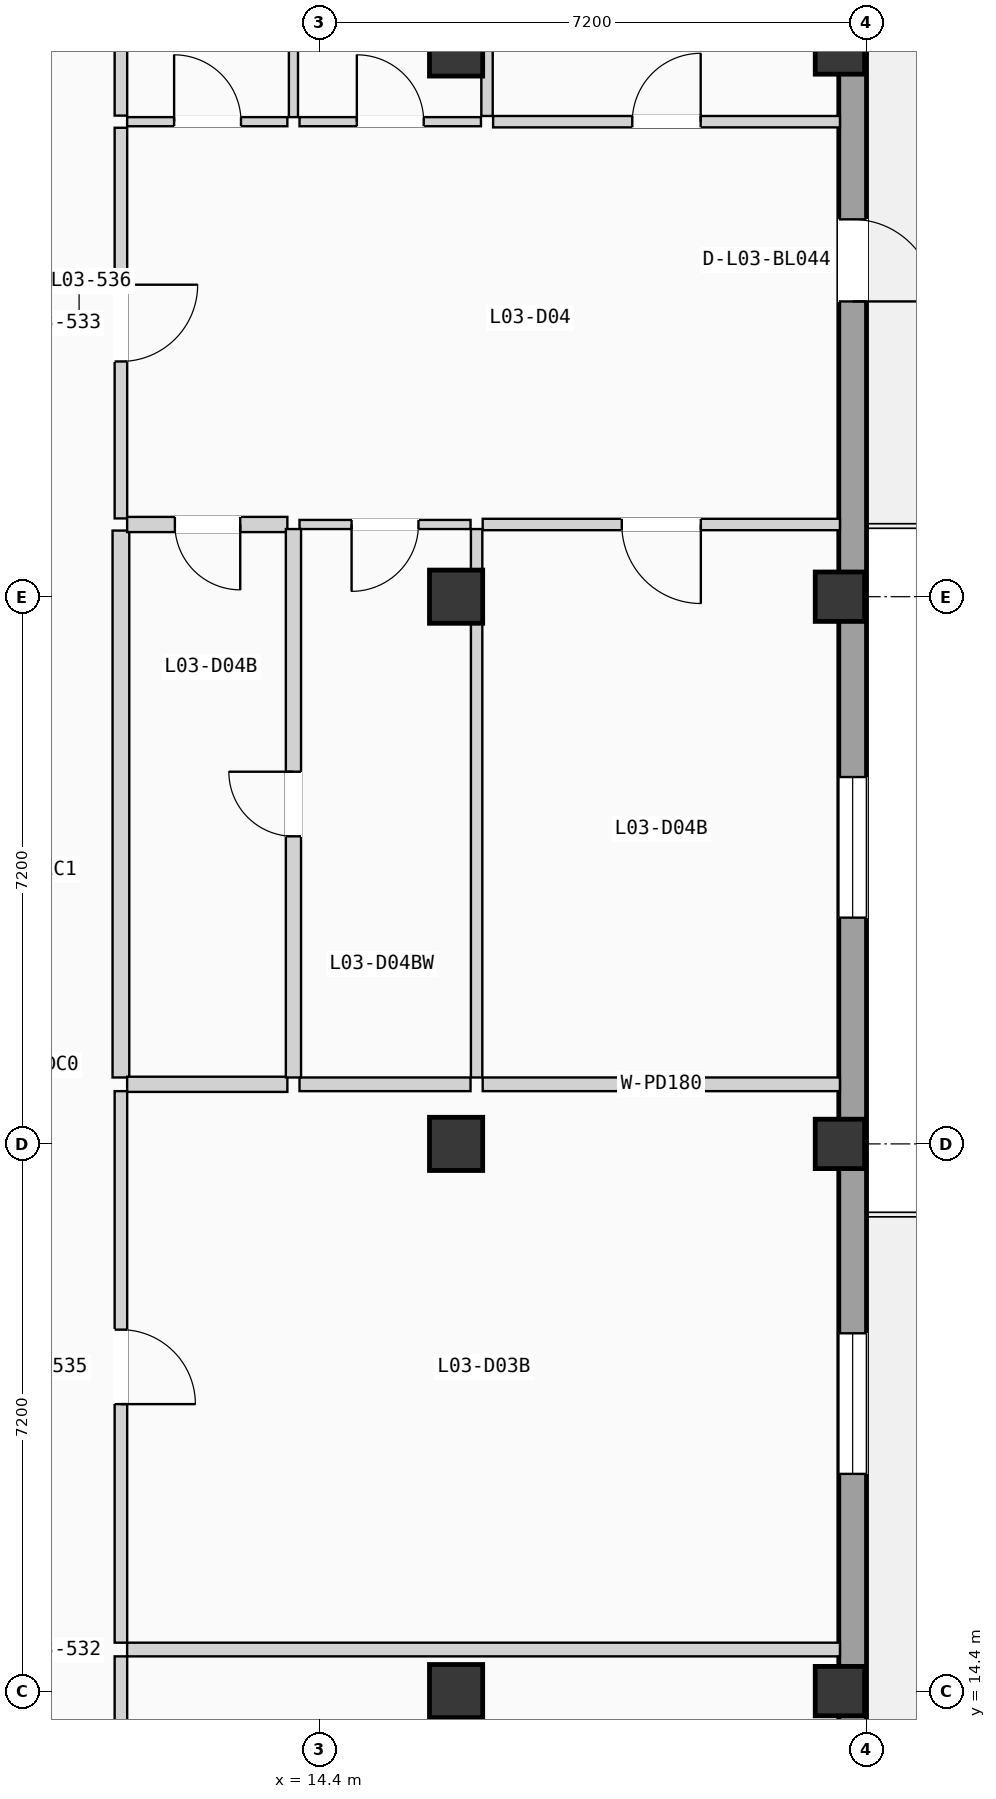
"""IFC4 building model, lengths in metres.
Left out: names, types, materials, properties, quantities, classifications, styles, units other than length and angle.
Written with IfcOpenShell. Run it as: python <this file> out.ifc"""

import sys

from ifc_helpers import new_model, si_unit, direction, frame, frame_2d, origin, origin_2d, place, context, subcontext, project, spatial, rectangle, extrude, element, fill, save


model = new_model("IFC4")
c1 = context("Model", 3, precision=1e-05, world=origin(), true_north=direction((0.0, 1.0)))
c2 = subcontext(c1, "Body", "Model", "MODEL_VIEW")
j1 = project(units=[si_unit("LENGTHUNIT", "METRE"), si_unit("PLANEANGLEUNIT", "RADIAN")], contexts=[c1])
p1 = place(None, origin())
s1 = spatial("IfcSite", under=j1, at=p1, CompositionType="ELEMENT")
p2 = place(p1, origin())
s2 = spatial("IfcBuilding", under=s1, at=p2, CompositionType="ELEMENT")
p3 = place(p2, frame((0.0, 0.0, 12.075)))
s3 = spatial("IfcBuildingStorey", under=s2, at=p3, CompositionType="ELEMENT", Elevation=12.075)
for number, where, z_axis, x_axis in (
    (1, (16.2, 14.4, 0.0), (0.0, 0.0, 1.0), (1.0, 0.0, 0.0)),
    (2, (16.2, 21.6, 0.0), (0.0, 0.0, 1.0), (1.0, 0.0, 0.0)),
    (3, (16.2, 28.8, 0.0), (0.0, 0.0, 1.0), (1.0, 0.0, 0.0)),
    (4, (16.2, 36.0, 0.0), (0.0, 0.0, 1.0), (1.0, 0.0, 0.0)),
):
    element("IfcColumn", number, at=place(p3, frame(where, z_axis=z_axis, x_axis=x_axis)), inside=s3, PredefinedType="COLUMN", context=c2, shape_type="SweptSolid", body=[
        extrude(rectangle(XDim=0.7, YDim=0.7, at=origin_2d()), origin(), (0.0, 0.0, 1.0), 3.15),
    ])
for number, where, z_axis, x_axis in (
    (5, (21.25, 14.4, 0.0), (0.0, 0.0, 1.0), (1.0, 0.0, 0.0)),
    (6, (21.25, 21.6, 0.0), (0.0, 0.0, 1.0), (1.0, 0.0, 0.0)),
    (7, (21.25, 28.8, 0.0), (0.0, 0.0, 1.0), (1.0, 0.0, 0.0)),
    (8, (21.25, 36.0, 0.0), (0.0, 0.0, 1.0), (1.0, 0.0, 0.0)),
):
    element("IfcColumn", number, at=place(p3, frame(where, z_axis=z_axis, x_axis=x_axis)), inside=s3, PredefinedType="COLUMN", context=c2, shape_type="SweptSolid", body=[
        extrude(rectangle(XDim=0.65, YDim=0.65, at=origin_2d()), origin(), (0.0, 0.0, 1.0), 3.15),
    ])
p4 = place(p3, frame((21.417, 0.365, 0.0), z_axis=(0.0, 0.0, 1.0), x_axis=(0.0, 1.0, 0.0)))
e9 = element("IfcWall", 9, at=p4, inside=s3, PredefinedType="SOLIDWALL", context=c2, shape_type="SweptSolid", body=[
    extrude(rectangle(XDim=49.67, YDim=0.365, at=frame_2d((24.835, 0.0))), origin(), (0.0, 0.0, 1.0), 2.89),
])
p5 = place(p4, frame((10.785, 0.0, 0.0)))
e10 = element("IfcOpeningElement", 10, at=p5, cuts=e9, PredefinedType="OPENING", context=c2, shape_type="SweptSolid", body=[
    extrude(rectangle(XDim=0.95, YDim=2.15, at=frame_2d((0.475, 1.075))), frame((0.0, 0.192, 0.0), z_axis=(0.0, -1.0, 0.0), x_axis=(1.0, 0.0, 0.0)), (0.0, 0.0, 1.0), 0.385),
])
p6 = place(p4, frame((16.893, 0.0, 0.855)))
e11 = element("IfcOpeningElement", 11, at=p6, cuts=e9, PredefinedType="OPENING", context=c2, shape_type="SweptSolid", body=[
    extrude(rectangle(XDim=1.85, YDim=1.35, at=frame_2d((0.925, 0.675))), frame((0.0, 0.192, 0.0), z_axis=(0.0, -1.0, 0.0), x_axis=(1.0, 0.0, 0.0)), (0.0, 0.0, 1.0), 0.385),
])
p7 = place(p4, frame((32.32, 0.0, 0.0)))
e12 = element("IfcOpeningElement", 12, at=p7, cuts=e9, PredefinedType="OPENING", context=c2, shape_type="SweptSolid", body=[
    extrude(rectangle(XDim=1.08, YDim=2.18, at=frame_2d((0.54, 1.09))), frame((0.0, 0.192, 0.0), z_axis=(0.0, -1.0, 0.0), x_axis=(1.0, 0.0, 0.0)), (0.0, 0.0, 1.0), 0.385),
])
p8 = place(p4, frame((24.212, 0.0, 0.705)))
e13 = element("IfcOpeningElement", 13, at=p8, cuts=e9, PredefinedType="OPENING", context=c2, shape_type="SweptSolid", body=[
    extrude(rectangle(XDim=1.85, YDim=1.5, at=frame_2d((0.925, 0.75))), frame((0.0, 0.192, 0.0), z_axis=(0.0, -1.0, 0.0), x_axis=(1.0, 0.0, 0.0)), (0.0, 0.0, 1.0), 0.385),
])
p9 = place(p4, frame((38.245, 0.0, 0.555)))
e14 = element("IfcOpeningElement", 14, at=p9, cuts=e9, PredefinedType="OPENING", context=c2, shape_type="SweptSolid", body=[
    extrude(rectangle(XDim=1.85, YDim=1.65, at=frame_2d((0.925, 0.825))), frame((0.0, 0.192, 0.0), z_axis=(0.0, -1.0, 0.0), x_axis=(1.0, 0.0, 0.0)), (0.0, 0.0, 1.0), 0.385),
])
p10 = place(p3, frame((11.79, 7.545, 0.0), z_axis=(0.0, 0.0, 1.0), x_axis=(0.0, 1.0, 0.0)))
e15 = element("IfcWall", 15, at=p10, inside=s3, PredefinedType="PARTITIONING", context=c2, shape_type="SweptSolid", body=[
    extrude(rectangle(XDim=7.312, YDim=0.165, at=frame_2d((3.656, 0.0))), origin(), (0.0, 0.0, 1.0), 2.87),
])
p11 = place(p10, frame((3.194, 0.0, 0.0)))
e16 = element("IfcOpeningElement", 16, at=p11, cuts=e15, PredefinedType="OPENING", context=c2, shape_type="SweptSolid", body=[
    extrude(rectangle(XDim=0.98, YDim=2.08, at=frame_2d((0.49, 1.04))), frame((0.0, 0.093, 0.0), z_axis=(0.0, -1.0, 0.0), x_axis=(1.0, 0.0, 0.0)), (0.0, 0.0, 1.0), 0.185),
])
p12 = place(p3, frame((11.79, 15.037, 0.0), z_axis=(0.0, 0.0, 1.0), x_axis=(0.0, 1.0, 0.0)))
e17 = element("IfcWall", 17, at=p12, inside=s3, PredefinedType="PARTITIONING", context=c2, shape_type="SweptSolid", body=[
    extrude(rectangle(XDim=7.257, YDim=0.165, at=frame_2d((3.628, 0.0))), origin(), (0.0, 0.0, 1.0), 2.87),
])
p13 = place(p12, frame((3.139, 0.0, 0.0)))
e18 = element("IfcOpeningElement", 18, at=p13, cuts=e17, PredefinedType="OPENING", context=c2, shape_type="SweptSolid", body=[
    extrude(rectangle(XDim=0.98, YDim=2.08, at=frame_2d((0.49, 1.04))), frame((0.0, 0.093, 0.0), z_axis=(0.0, -1.0, 0.0), x_axis=(1.0, 0.0, 0.0)), (0.0, 0.0, 1.0), 0.185),
])
p14 = place(p3, frame((11.79, 29.83, 0.0), z_axis=(0.0, 0.0, 1.0), x_axis=(0.0, 1.0, 0.0)))
e19 = element("IfcWall", 19, at=p14, inside=s3, PredefinedType="PARTITIONING", context=c2, shape_type="SweptSolid", body=[
    extrude(rectangle(XDim=5.14, YDim=0.165, at=frame_2d((2.57, 0.0))), origin(), (0.0, 0.0, 1.0), 2.87),
])
p15 = place(p14, frame((2.065, 0.0, 0.0)))
e20 = element("IfcOpeningElement", 20, at=p15, cuts=e19, PredefinedType="OPENING", context=c2, shape_type="SweptSolid", body=[
    extrude(rectangle(XDim=1.01, YDim=2.11, at=frame_2d((0.505, 1.055))), frame((0.0, 0.093, 0.0), z_axis=(0.0, -1.0, 0.0), x_axis=(1.0, 0.0, 0.0)), (0.0, 0.0, 1.0), 0.185),
])
p16 = place(p3, frame((11.79, 22.474, 0.0), z_axis=(0.0, 0.0, 1.0), x_axis=(0.0, 1.0, 0.0)))
e21 = element("IfcWall", 21, at=p16, inside=s3, PredefinedType="PLUMBINGWALL", context=c2, shape_type="SweptSolid", body=[
    extrude(rectangle(XDim=7.196, YDim=0.22, at=frame_2d((3.598, 0.0))), origin(), (0.0, 0.0, 1.0), 2.87),
])
p17 = place(p3, frame((11.79, 35.13, 0.0), z_axis=(0.0, 0.0, 1.0), x_axis=(0.0, 1.0, 0.0)))
e22 = element("IfcWall", 22, at=p17, inside=s3, PredefinedType="PARTITIONING", context=c2, shape_type="SweptSolid", body=[
    extrude(rectangle(XDim=7.67, YDim=0.165, at=frame_2d((3.835, 0.0))), origin(), (0.0, 0.0, 1.0), 2.87),
])
p18 = place(p3, frame((11.872, 14.947, 0.0), z_axis=(0.0, 0.0, 1.0), x_axis=(1.0, 0.0, 0.0)))
e23 = element("IfcWall", 23, at=p18, inside=s3, PredefinedType="PARTITIONING", context=c2, shape_type="SweptSolid", body=[
    extrude(rectangle(XDim=9.378, YDim=0.18, at=frame_2d((4.689, 0.0))), origin(), (0.0, 0.0, 1.0), 2.87),
])
p19 = place(p3, frame((11.872, 22.384, 0.0), z_axis=(0.0, 0.0, 1.0), x_axis=(1.0, 0.0, 0.0)))
e24 = element("IfcWall", 24, at=p19, inside=s3, PredefinedType="PLUMBINGWALL", context=c2, shape_type="SweptSolid", body=[
    extrude(rectangle(XDim=2.108, YDim=0.2, at=frame_2d((1.054, 0.0))), origin(), (0.0, 0.0, 1.0), 2.87),
])
p20 = place(p3, frame((16.55, 22.384, 0.0), z_axis=(0.0, 0.0, 1.0), x_axis=(1.0, 0.0, 0.0)))
e25 = element("IfcWall", 25, at=p20, inside=s3, PredefinedType="PARTITIONING", context=c2, shape_type="SweptSolid", body=[
    extrude(rectangle(XDim=4.7, YDim=0.18, at=frame_2d((2.35, 0.0))), origin(), (0.0, 0.0, 1.0), 2.87),
])
p21 = place(p3, frame((14.14, 22.384, 0.0), z_axis=(0.0, 0.0, 1.0), x_axis=(1.0, 0.0, 0.0)))
e26 = element("IfcWall", 26, at=p21, inside=s3, PredefinedType="PARTITIONING", context=c2, shape_type="SweptSolid", body=[
    extrude(rectangle(XDim=2.25, YDim=0.18, at=frame_2d((1.125, 0.0))), origin(), (0.0, 0.0, 1.0), 2.87),
])
p22 = place(p3, frame((11.872, 29.75, 0.0), z_axis=(0.0, 0.0, 1.0), x_axis=(1.0, 0.0, 0.0)))
e27 = element("IfcWall", 27, at=p22, inside=s3, PredefinedType="PLUMBINGWALL", context=c2, shape_type="SweptSolid", body=[
    extrude(rectangle(XDim=2.108, YDim=0.2, at=frame_2d((1.054, 0.0))), origin(), (0.0, 0.0, 1.0), 2.87),
])
p23 = place(p22, frame((0.628, 0.0, 0.0)))
e28 = element("IfcOpeningElement", 28, at=p23, cuts=e27, PredefinedType="OPENING", context=c2, shape_type="SweptSolid", body=[
    extrude(rectangle(XDim=0.86, YDim=2.0, at=frame_2d((0.43, 1.0))), frame((0.0, 0.11, 0.0), z_axis=(0.0, -1.0, 0.0), x_axis=(1.0, 0.0, 0.0)), (0.0, 0.0, 1.0), 0.22),
])
p24 = place(p3, frame((11.872, 35.05, 0.0), z_axis=(0.0, 0.0, 1.0), x_axis=(1.0, 0.0, 0.0)))
e29 = element("IfcWall", 29, at=p24, inside=s3, PredefinedType="PARTITIONING", context=c2, shape_type="SweptSolid", body=[
    extrude(rectangle(XDim=2.108, YDim=0.12, at=frame_2d((1.054, 0.0))), origin(), (0.0, 0.0, 1.0), 2.87),
])
p25 = place(p24, frame((0.618, 0.0, 0.0)))
e30 = element("IfcOpeningElement", 30, at=p25, cuts=e29, PredefinedType="OPENING", context=c2, shape_type="SweptSolid", body=[
    extrude(rectangle(XDim=0.88, YDim=2.02, at=frame_2d((0.44, 1.01))), frame((0.0, 0.07, 0.0), z_axis=(0.0, -1.0, 0.0), x_axis=(1.0, 0.0, 0.0)), (0.0, 0.0, 1.0), 0.14),
])
p26 = place(p3, frame((16.55, 29.75, 0.0), z_axis=(0.0, 0.0, 1.0), x_axis=(1.0, 0.0, 0.0)))
e31 = element("IfcWall", 31, at=p26, inside=s3, PredefinedType="PARTITIONING", context=c2, shape_type="SweptSolid", body=[
    extrude(rectangle(XDim=4.7, YDim=0.15, at=frame_2d((2.35, 0.0))), origin(), (0.0, 0.0, 1.0), 2.87),
])
p27 = place(p26, frame((1.83, 0.0, 0.0)))
e32 = element("IfcOpeningElement", 32, at=p27, cuts=e31, PredefinedType="OPENING", context=c2, shape_type="SweptSolid", body=[
    extrude(rectangle(XDim=1.04, YDim=2.08, at=frame_2d((0.52, 1.04))), frame((0.0, 0.085, 0.0), z_axis=(0.0, -1.0, 0.0), x_axis=(1.0, 0.0, 0.0)), (0.0, 0.0, 1.0), 0.17),
])
p28 = place(p3, frame((14.14, 29.75, 0.0), z_axis=(0.0, 0.0, 1.0), x_axis=(1.0, 0.0, 0.0)))
e33 = element("IfcWall", 33, at=p28, inside=s3, PredefinedType="PARTITIONING", context=c2, shape_type="SweptSolid", body=[
    extrude(rectangle(XDim=2.25, YDim=0.12, at=frame_2d((1.125, 0.0))), origin(), (0.0, 0.0, 1.0), 2.87),
])
p29 = place(p28, frame((0.685, 0.0, 0.0)))
e34 = element("IfcOpeningElement", 34, at=p29, cuts=e33, PredefinedType="OPENING", context=c2, shape_type="SweptSolid", body=[
    extrude(rectangle(XDim=0.88, YDim=2.02, at=frame_2d((0.44, 1.01))), frame((0.0, 0.07, 0.0), z_axis=(0.0, -1.0, 0.0), x_axis=(1.0, 0.0, 0.0)), (0.0, 0.0, 1.0), 0.14),
])
p30 = place(p3, frame((16.687, 35.05, 0.0), z_axis=(0.0, 0.0, 1.0), x_axis=(1.0, 0.0, 0.0)))
e35 = element("IfcWall", 35, at=p30, inside=s3, PredefinedType="PARTITIONING", context=c2, shape_type="SweptSolid", body=[
    extrude(rectangle(XDim=4.563, YDim=0.15, at=frame_2d((2.281, 0.0))), origin(), (0.0, 0.0, 1.0), 2.87),
])
p31 = place(p30, frame((1.831, 0.0, 0.0)))
e36 = element("IfcOpeningElement", 36, at=p31, cuts=e35, PredefinedType="OPENING", context=c2, shape_type="SweptSolid", body=[
    extrude(rectangle(XDim=0.9, YDim=2.04, at=frame_2d((0.45, 1.02))), frame((0.0, 0.085, 0.0), z_axis=(0.0, -1.0, 0.0), x_axis=(1.0, 0.0, 0.0)), (0.0, 0.0, 1.0), 0.17),
])
p32 = place(p3, frame((14.14, 35.05, 0.0), z_axis=(0.0, 0.0, 1.0), x_axis=(1.0, 0.0, 0.0)))
e37 = element("IfcWall", 37, at=p32, inside=s3, PredefinedType="PARTITIONING", context=c2, shape_type="SweptSolid", body=[
    extrude(rectangle(XDim=2.387, YDim=0.12, at=frame_2d((1.194, 0.0))), origin(), (0.0, 0.0, 1.0), 2.87),
])
p33 = place(p32, frame((0.754, 0.0, 0.0)))
e38 = element("IfcOpeningElement", 38, at=p33, cuts=e37, PredefinedType="OPENING", context=c2, shape_type="SweptSolid", body=[
    extrude(rectangle(XDim=0.88, YDim=2.02, at=frame_2d((0.44, 1.01))), frame((0.0, 0.07, 0.0), z_axis=(0.0, -1.0, 0.0), x_axis=(1.0, 0.0, 0.0)), (0.0, 0.0, 1.0), 0.14),
])
p34 = place(p3, frame((14.06, 22.474, 0.0), z_axis=(0.0, 0.0, 1.0), x_axis=(0.0, 1.0, 0.0)))
e39 = element("IfcWall", 39, at=p34, inside=s3, PredefinedType="PLUMBINGWALL", context=c2, shape_type="SweptSolid", body=[
    extrude(rectangle(XDim=7.216, YDim=0.2, at=frame_2d((3.608, 0.0))), origin(), (0.0, 0.0, 1.0), 2.87),
])
p35 = place(p34, frame((3.173, 0.0, 0.0)))
e40 = element("IfcOpeningElement", 40, at=p35, cuts=e39, PredefinedType="OPENING", context=c2, shape_type="SweptSolid", body=[
    extrude(rectangle(XDim=0.85, YDim=2.01, at=frame_2d((0.425, 1.005))), frame((0.0, 0.11, 0.0), z_axis=(0.0, -1.0, 0.0), x_axis=(1.0, 0.0, 0.0)), (0.0, 0.0, 1.0), 0.22),
])
p36 = place(p3, frame((14.06, 35.11, 0.0), z_axis=(0.0, 0.0, 1.0), x_axis=(0.0, 1.0, 0.0)))
e41 = element("IfcWall", 41, at=p36, inside=s3, PredefinedType="PARTITIONING", context=c2, shape_type="SweptSolid", body=[
    extrude(rectangle(XDim=7.69, YDim=0.12, at=frame_2d((3.845, 0.0))), origin(), (0.0, 0.0, 1.0), 2.87),
])
p37 = place(p3, frame((16.47, 22.474, 0.0), z_axis=(0.0, 0.0, 1.0), x_axis=(0.0, 1.0, 0.0)))
e42 = element("IfcWall", 42, at=p37, inside=s3, PredefinedType="PARTITIONING", context=c2, shape_type="SweptSolid", body=[
    extrude(rectangle(XDim=7.216, YDim=0.15, at=frame_2d((3.608, 0.0))), origin(), (0.0, 0.0, 1.0), 2.87),
])
p38 = place(p3, frame((16.607, 35.125, 0.0), z_axis=(0.0, 0.0, 1.0), x_axis=(0.0, 1.0, 0.0)))
e43 = element("IfcWall", 43, at=p38, inside=s3, PredefinedType="PARTITIONING", context=c2, shape_type="SweptSolid", body=[
    extrude(rectangle(XDim=7.675, YDim=0.15, at=frame_2d((3.837, 0.0))), origin(), (0.0, 0.0, 1.0), 2.87),
])
p39 = place(p6, origin())
e44 = element("IfcWindow", 44, at=p39, inside=s3, PartitioningType="DOUBLE_PANEL_VERTICAL", PredefinedType="WINDOW", context=c2, shape_type="SweptSolid", body=[
    extrude(rectangle(XDim=1.85, YDim=1.35, at=frame_2d((0.925, 0.675))), frame((0.0, 0.03, 0.0), z_axis=(0.0, -1.0, 0.0), x_axis=(1.0, 0.0, 0.0)), (0.0, 0.0, 1.0), 0.06),
])
fill(e11, e44)
p40 = place(p7, frame((1.08, 0.0, 0.0), z_axis=(0.0, 0.0, 1.0), x_axis=(-1.0, 0.0, 0.0)))
e45 = element("IfcDoor", 45, at=p40, inside=s3, OperationType="SINGLE_SWING_LEFT", PredefinedType="DOOR", context=c2, shape_type="SweptSolid", body=[
    extrude(rectangle(XDim=1.08, YDim=2.18, at=frame_2d((0.54, 1.09))), frame((0.0, 0.025, 0.0), z_axis=(0.0, -1.0, 0.0), x_axis=(1.0, 0.0, 0.0)), (0.0, 0.0, 1.0), 0.05),
])
fill(e12, e45)
p41 = place(p8, origin())
e46 = element("IfcWindow", 46, at=p41, inside=s3, PartitioningType="DOUBLE_PANEL_VERTICAL", PredefinedType="WINDOW", context=c2, shape_type="SweptSolid", body=[
    extrude(rectangle(XDim=1.85, YDim=1.5, at=frame_2d((0.925, 0.75))), frame((0.0, 0.03, 0.0), z_axis=(0.0, -1.0, 0.0), x_axis=(1.0, 0.0, 0.0)), (0.0, 0.0, 1.0), 0.06),
])
fill(e13, e46)
p42 = place(p13, frame((0.98, 0.0, 0.0), z_axis=(0.0, 0.0, 1.0), x_axis=(-1.0, 0.0, 0.0)))
e47 = element("IfcDoor", 47, at=p42, inside=s3, OperationType="SINGLE_SWING_LEFT", PredefinedType="DOOR", context=c2, shape_type="SweptSolid", body=[
    extrude(rectangle(XDim=0.98, YDim=2.08, at=frame_2d((0.49, 1.04))), frame((0.0, 0.025, 0.0), z_axis=(0.0, -1.0, 0.0), x_axis=(1.0, 0.0, 0.0)), (0.0, 0.0, 1.0), 0.05),
])
fill(e18, e47)
p43 = place(p15, frame((1.01, 0.0, 0.0), z_axis=(0.0, 0.0, 1.0), x_axis=(-1.0, 0.0, 0.0)))
e48 = element("IfcDoor", 48, at=p43, inside=s3, OperationType="SINGLE_SWING_RIGHT", PredefinedType="DOOR", context=c2, shape_type="SweptSolid", body=[
    extrude(rectangle(XDim=1.01, YDim=2.11, at=frame_2d((0.505, 1.055))), frame((0.0, 0.025, 0.0), z_axis=(0.0, -1.0, 0.0), x_axis=(1.0, 0.0, 0.0)), (0.0, 0.0, 1.0), 0.05),
])
fill(e20, e48)
p44 = place(p23, frame((0.86, 0.0, 0.0), z_axis=(0.0, 0.0, 1.0), x_axis=(-1.0, 0.0, 0.0)))
e49 = element("IfcDoor", 49, at=p44, inside=s3, OperationType="SINGLE_SWING_RIGHT", PredefinedType="DOOR", context=c2, shape_type="SweptSolid", body=[
    extrude(rectangle(XDim=0.86, YDim=2.0, at=frame_2d((0.43, 1.0))), frame((0.0, 0.025, 0.0), z_axis=(0.0, -1.0, 0.0), x_axis=(1.0, 0.0, 0.0)), (0.0, 0.0, 1.0), 0.05),
])
fill(e28, e49)
p45 = place(p25, origin())
e50 = element("IfcDoor", 50, at=p45, inside=s3, OperationType="SINGLE_SWING_LEFT", PredefinedType="DOOR", context=c2, shape_type="SweptSolid", body=[
    extrude(rectangle(XDim=0.88, YDim=2.02, at=frame_2d((0.44, 1.01))), frame((0.0, 0.025, 0.0), z_axis=(0.0, -1.0, 0.0), x_axis=(1.0, 0.0, 0.0)), (0.0, 0.0, 1.0), 0.05),
])
fill(e30, e50)
p46 = place(p27, frame((1.04, 0.0, 0.0), z_axis=(0.0, 0.0, 1.0), x_axis=(-1.0, 0.0, 0.0)))
e51 = element("IfcDoor", 51, at=p46, inside=s3, OperationType="SINGLE_SWING_RIGHT", PredefinedType="DOOR", context=c2, shape_type="SweptSolid", body=[
    extrude(rectangle(XDim=1.04, YDim=2.08, at=frame_2d((0.52, 1.04))), frame((0.0, 0.025, 0.0), z_axis=(0.0, -1.0, 0.0), x_axis=(1.0, 0.0, 0.0)), (0.0, 0.0, 1.0), 0.05),
])
fill(e32, e51)
p47 = place(p29, frame((0.88, 0.0, 0.0), z_axis=(0.0, 0.0, 1.0), x_axis=(-1.0, 0.0, 0.0)))
e52 = element("IfcDoor", 52, at=p47, inside=s3, OperationType="SINGLE_SWING_LEFT", PredefinedType="DOOR", context=c2, shape_type="SweptSolid", body=[
    extrude(rectangle(XDim=0.88, YDim=2.02, at=frame_2d((0.44, 1.01))), frame((0.0, 0.025, 0.0), z_axis=(0.0, -1.0, 0.0), x_axis=(1.0, 0.0, 0.0)), (0.0, 0.0, 1.0), 0.05),
])
fill(e34, e52)
p48 = place(p31, origin())
e53 = element("IfcDoor", 53, at=p48, inside=s3, OperationType="SINGLE_SWING_RIGHT", PredefinedType="DOOR", context=c2, shape_type="SweptSolid", body=[
    extrude(rectangle(XDim=0.9, YDim=2.04, at=frame_2d((0.45, 1.02))), frame((0.0, 0.025, 0.0), z_axis=(0.0, -1.0, 0.0), x_axis=(1.0, 0.0, 0.0)), (0.0, 0.0, 1.0), 0.05),
])
fill(e36, e53)
p49 = place(p33, origin())
e54 = element("IfcDoor", 54, at=p49, inside=s3, OperationType="SINGLE_SWING_LEFT", PredefinedType="DOOR", context=c2, shape_type="SweptSolid", body=[
    extrude(rectangle(XDim=0.88, YDim=2.02, at=frame_2d((0.44, 1.01))), frame((0.0, 0.025, 0.0), z_axis=(0.0, -1.0, 0.0), x_axis=(1.0, 0.0, 0.0)), (0.0, 0.0, 1.0), 0.05),
])
fill(e38, e54)
p50 = place(p35, origin())
e55 = element("IfcDoor", 55, at=p50, inside=s3, OperationType="SINGLE_SWING_RIGHT", PredefinedType="DOOR", context=c2, shape_type="SweptSolid", body=[
    extrude(rectangle(XDim=0.85, YDim=2.01, at=frame_2d((0.425, 1.005))), frame((0.0, 0.025, 0.0), z_axis=(0.0, -1.0, 0.0), x_axis=(1.0, 0.0, 0.0)), (0.0, 0.0, 1.0), 0.05),
])
fill(e40, e55)
save(model, sys.argv[1])
